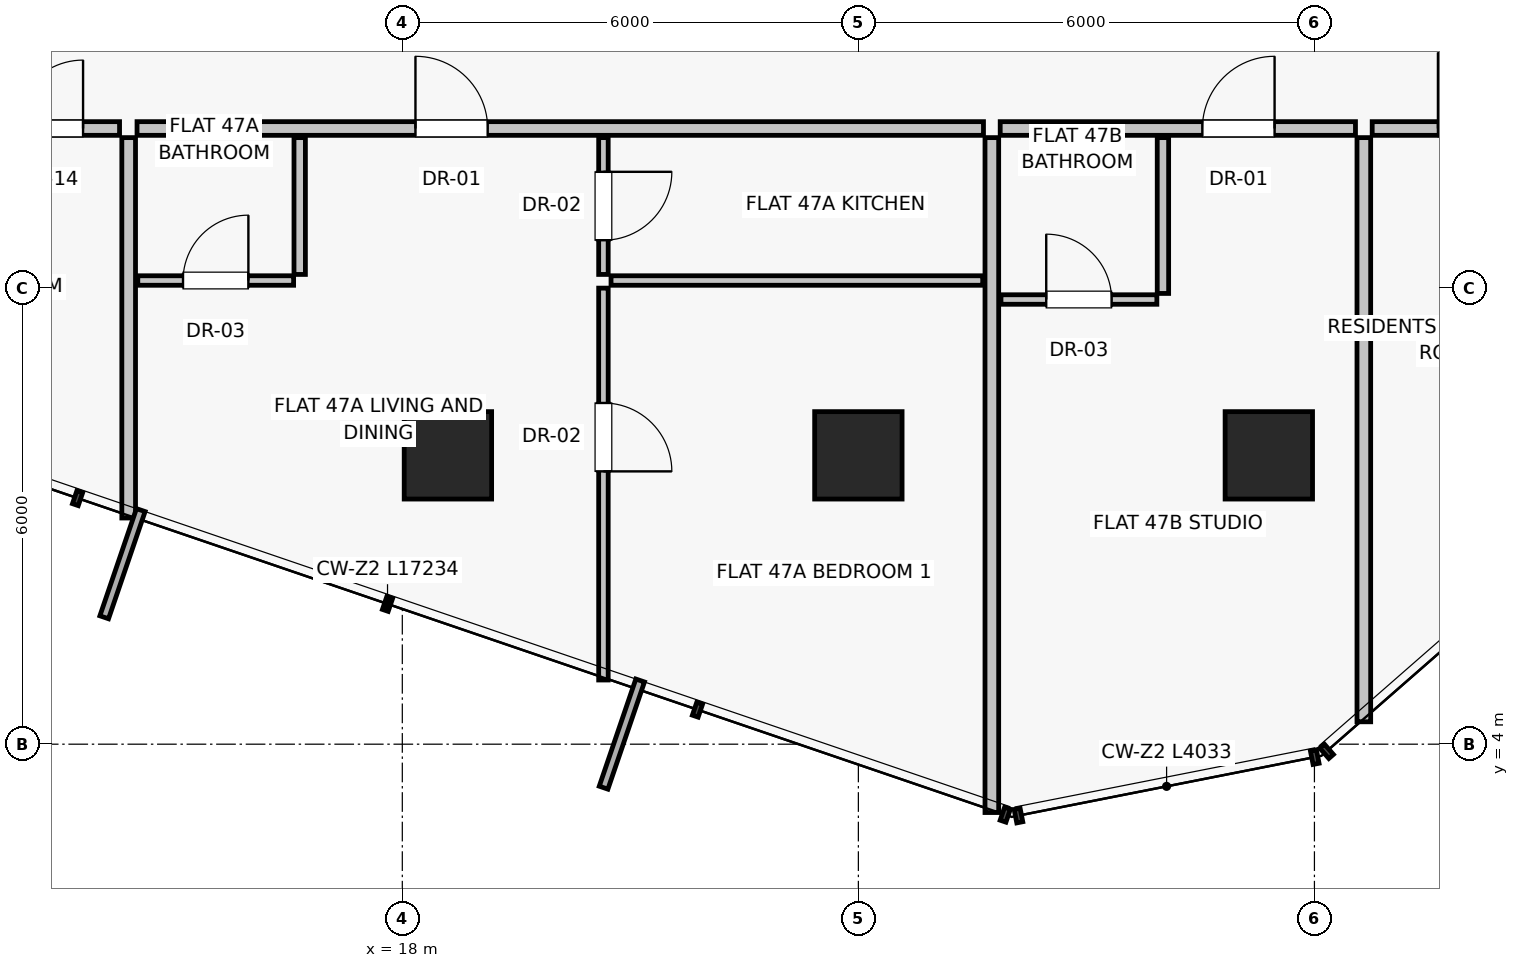
"""IFC4 building model, lengths in metres.
Left out: names, types, materials, properties, quantities, classifications, styles, units other than length and angle.
Written with IfcOpenShell. Run it as: python <this file> out.ifc"""

import sys

from ifc_helpers import new_model, si_unit, direction, frame, frame_2d, origin, origin_2d, place, context, subcontext, project, spatial, rectangle, extrude, source, transform, mapped, element, fill, save


model = new_model("IFC4")
c1 = context("Model", 3, precision=1e-05, world=origin(), true_north=direction((0.0, 1.0)))
c2 = subcontext(c1, "Body", "Model", "MODEL_VIEW")
j1 = project(units=[si_unit("LENGTHUNIT", "METRE"), si_unit("PLANEANGLEUNIT", "RADIAN")], contexts=[c1])
p1 = place(None, origin())
s1 = spatial("IfcSite", under=j1, at=p1, CompositionType="ELEMENT")
p2 = place(p1, origin())
s2 = spatial("IfcBuilding", under=s1, at=p2, CompositionType="ELEMENT")
p3 = place(p2, frame((0.0, 0.0, 166.3)))
s3 = spatial("IfcBuildingStorey", under=s2, at=p3, CompositionType="ELEMENT", Elevation=166.3)
for number, where, z_axis, x_axis in (
    (1, (18.6, 7.8, 0.0), (0.0, 0.0, 1.0), (1.0, 0.0, 0.0)),
    (2, (24.0, 7.8, 0.0), (0.0, 0.0, 1.0), (1.0, 0.0, 0.0)),
    (3, (29.4, 7.8, 0.0), (0.0, 0.0, 1.0), (1.0, 0.0, 0.0)),
):
    element("IfcColumn", number, at=place(p3, frame(where, z_axis=z_axis, x_axis=x_axis)), inside=s3, PredefinedType="COLUMN", context=c2, shape_type="SweptSolid", body=[
        extrude(rectangle(XDim=1.15, YDim=1.15, at=origin_2d()), origin(), (0.0, 0.0, 1.0), 3.25),
    ])
p4 = place(p3, frame((14.4, 11.98, 0.0), z_axis=(0.0, 0.0, 1.0), x_axis=(0.0, -1.0, 0.0)))
e4 = element("IfcWall", 4, at=p4, inside=s3, PredefinedType="PARTITIONING", context=c2, shape_type="SweptSolid", body=[
    extrude(rectangle(XDim=5.004, YDim=0.18, at=frame_2d((2.502, 0.0))), origin(), (0.0, 0.0, 1.0), 2.93),
])
p5 = place(p3, frame((14.51, 12.1, 0.0), z_axis=(0.0, 0.0, 1.0), x_axis=(1.0, 0.0, 0.0)))
e5 = element("IfcWall", 5, at=p5, inside=s3, PredefinedType="PARTITIONING", context=c2, shape_type="SweptSolid", body=[
    extrude(rectangle(XDim=11.136, YDim=0.18, at=frame_2d((5.568, 0.0))), origin(), (0.0, 0.0, 1.0), 2.51),
])
p6 = place(p5, frame((3.663, 0.0, 0.0)))
e6 = element("IfcOpeningElement", 6, at=p6, cuts=e5, PredefinedType="OPENING", context=c2, shape_type="SweptSolid", body=[
    extrude(rectangle(XDim=0.95, YDim=2.02, at=frame_2d((0.475, 1.01))), frame((0.0, 0.1, 0.0), z_axis=(0.0, -1.0, 0.0), x_axis=(1.0, 0.0, 0.0)), (0.0, 0.0, 1.0), 0.2),
])
p7 = place(p3, frame((16.65, 11.98, 0.0), z_axis=(0.0, 0.0, 1.0), x_axis=(0.0, -1.0, 0.0)))
e7 = element("IfcWall", 7, at=p7, inside=s3, PredefinedType="PARTITIONING", context=c2, shape_type="SweptSolid", body=[
    extrude(rectangle(XDim=1.8, YDim=0.15, at=frame_2d((0.9, 0.0))), origin(), (0.0, 0.0, 1.0), 2.93),
])
p8 = place(p3, frame((14.52, 10.1, 0.0), z_axis=(0.0, 0.0, 1.0), x_axis=(1.0, 0.0, 0.0)))
e8 = element("IfcWall", 8, at=p8, inside=s3, PredefinedType="PARTITIONING", context=c2, shape_type="SweptSolid", body=[
    extrude(rectangle(XDim=2.05, YDim=0.125, at=frame_2d((1.025, 0.0))), origin(), (0.0, 0.0, 1.0), 2.93),
])
p9 = place(p8, frame((0.595, 0.0, 0.0)))
e9 = element("IfcOpeningElement", 9, at=p9, cuts=e8, PredefinedType="OPENING", context=c2, shape_type="SweptSolid", body=[
    extrude(rectangle(XDim=0.86, YDim=2.01, at=frame_2d((0.43, 1.005))), frame((0.0, 0.073, 0.0), z_axis=(0.0, -1.0, 0.0), x_axis=(1.0, 0.0, 0.0)), (0.0, 0.0, 1.0), 0.145),
])
p10 = place(p3, frame((20.646, 11.98, 0.0), z_axis=(0.0, 0.0, 1.0), x_axis=(0.0, -1.0, 0.0)))
e10 = element("IfcWall", 10, at=p10, inside=s3, PredefinedType="PARTITIONING", context=c2, shape_type="SweptSolid", body=[
    extrude(rectangle(XDim=1.8, YDim=0.125, at=frame_2d((0.9, 0.0))), origin(), (0.0, 0.0, 1.0), 2.93),
])
p11 = place(p10, frame((0.45, 0.0, 0.0)))
e11 = element("IfcOpeningElement", 11, at=p11, cuts=e10, PredefinedType="OPENING", context=c2, shape_type="SweptSolid", body=[
    extrude(rectangle(XDim=0.9, YDim=2.01, at=frame_2d((0.45, 1.005))), frame((0.0, 0.073, 0.0), z_axis=(0.0, -1.0, 0.0), x_axis=(1.0, 0.0, 0.0)), (0.0, 0.0, 1.0), 0.145),
])
p12 = place(p3, frame((20.746, 10.1, 0.0), z_axis=(0.0, 0.0, 1.0), x_axis=(1.0, 0.0, 0.0)))
e12 = element("IfcWall", 12, at=p12, inside=s3, PredefinedType="PARTITIONING", context=c2, shape_type="SweptSolid", body=[
    extrude(rectangle(XDim=4.89, YDim=0.125, at=frame_2d((2.445, 0.0))), origin(), (0.0, 0.0, 1.0), 2.93),
])
p13 = place(p3, frame((20.646, 10.0, 0.0), z_axis=(0.0, 0.0, 1.0), x_axis=(0.0, -1.0, 0.0)))
e13 = element("IfcWall", 13, at=p13, inside=s3, PredefinedType="PARTITIONING", context=c2, shape_type="SweptSolid", body=[
    extrude(rectangle(XDim=5.156, YDim=0.125, at=frame_2d((2.578, 0.0))), origin(), (0.0, 0.0, 1.0), 2.93),
])
p14 = place(p13, frame((1.511, 0.0, 0.0)))
e14 = element("IfcOpeningElement", 14, at=p14, cuts=e13, PredefinedType="OPENING", context=c2, shape_type="SweptSolid", body=[
    extrude(rectangle(XDim=0.9, YDim=2.01, at=frame_2d((0.45, 1.005))), frame((0.0, 0.073, 0.0), z_axis=(0.0, -1.0, 0.0), x_axis=(1.0, 0.0, 0.0)), (0.0, 0.0, 1.0), 0.145),
])
p15 = place(p3, frame((25.756, 11.98, 0.0), z_axis=(0.0, 0.0, 1.0), x_axis=(0.0, -1.0, 0.0)))
e15 = element("IfcWall", 15, at=p15, inside=s3, PredefinedType="PARTITIONING", context=c2, shape_type="SweptSolid", body=[
    extrude(rectangle(XDim=8.879, YDim=0.18, at=frame_2d((4.439, 0.0))), origin(), (0.0, 0.0, 1.0), 2.93),
])
p16 = place(p3, frame((30.76, 12.1, 0.0), z_axis=(0.0, 0.0, 1.0), x_axis=(1.0, 0.0, 0.0)))
e16 = element("IfcWall", 16, at=p16, inside=s3, PredefinedType="PARTITIONING", context=c2, shape_type="SweptSolid", body=[
    extrude(rectangle(XDim=2.73, YDim=0.18, at=frame_2d((1.365, 0.0))), origin(), (0.0, 0.0, 1.0), 2.93),
])
p17 = place(p16, frame((0.865, 0.0, 0.0)))
e17 = element("IfcOpeningElement", 17, at=p17, cuts=e16, PredefinedType="OPENING", context=c2, shape_type="SweptSolid", body=[
    extrude(rectangle(XDim=1.0, YDim=2.01, at=frame_2d((0.5, 1.005))), frame((0.0, 0.1, 0.0), z_axis=(0.0, -1.0, 0.0), x_axis=(1.0, 0.0, 0.0)), (0.0, 0.0, 1.0), 0.2),
])
p18 = place(p3, frame((30.65, 11.98, 0.0), z_axis=(0.0, 0.0, 1.0), x_axis=(0.0, -1.0, 0.0)))
e18 = element("IfcWall", 18, at=p18, inside=s3, PredefinedType="PARTITIONING", context=c2, shape_type="SweptSolid", body=[
    extrude(rectangle(XDim=7.685, YDim=0.18, at=frame_2d((3.843, 0.0))), origin(), (0.0, 0.0, 1.0), 2.93),
])
p19 = place(p3, frame((25.866, 12.1, 0.0), z_axis=(0.0, 0.0, 1.0), x_axis=(1.0, 0.0, 0.0)))
e19 = element("IfcWall", 19, at=p19, inside=s3, PredefinedType="PARTITIONING", context=c2, shape_type="SweptSolid", body=[
    extrude(rectangle(XDim=4.674, YDim=0.18, at=frame_2d((2.337, 0.0))), origin(), (0.0, 0.0, 1.0), 2.51),
])
p20 = place(p19, frame((2.66, 0.0, 0.0)))
e20 = element("IfcOpeningElement", 20, at=p20, cuts=e19, PredefinedType="OPENING", context=c2, shape_type="SweptSolid", body=[
    extrude(rectangle(XDim=0.95, YDim=2.02, at=frame_2d((0.475, 1.01))), frame((0.0, 0.1, 0.0), z_axis=(0.0, -1.0, 0.0), x_axis=(1.0, 0.0, 0.0)), (0.0, 0.0, 1.0), 0.2),
])
p21 = place(p3, frame((28.007, 11.98, 0.0), z_axis=(0.0, 0.0, 1.0), x_axis=(0.0, -1.0, 0.0)))
e21 = element("IfcWall", 21, at=p21, inside=s3, PredefinedType="PARTITIONING", context=c2, shape_type="SweptSolid", body=[
    extrude(rectangle(XDim=2.05, YDim=0.15, at=frame_2d((1.025, 0.0))), origin(), (0.0, 0.0, 1.0), 2.93),
])
p22 = place(p3, frame((25.876, 9.85, 0.0), z_axis=(0.0, 0.0, 1.0), x_axis=(1.0, 0.0, 0.0)))
e22 = element("IfcWall", 22, at=p22, inside=s3, PredefinedType="PARTITIONING", context=c2, shape_type="SweptSolid", body=[
    extrude(rectangle(XDim=2.051, YDim=0.125, at=frame_2d((1.025, 0.0))), origin(), (0.0, 0.0, 1.0), 2.93),
])
p23 = place(p22, frame((0.595, 0.0, 0.0)))
e23 = element("IfcOpeningElement", 23, at=p23, cuts=e22, PredefinedType="OPENING", context=c2, shape_type="SweptSolid", body=[
    extrude(rectangle(XDim=0.86, YDim=2.01, at=frame_2d((0.43, 1.005))), frame((0.0, 0.073, 0.0), z_axis=(0.0, -1.0, 0.0), x_axis=(1.0, 0.0, 0.0)), (0.0, 0.0, 1.0), 0.145),
])
p24 = place(p3, frame((12.42, 12.1, 0.0), z_axis=(0.0, 0.0, 1.0), x_axis=(1.0, 0.0, 0.0)))
e24 = element("IfcWall", 24, at=p24, inside=s3, PredefinedType="PARTITIONING", context=c2, shape_type="SweptSolid", body=[
    extrude(rectangle(XDim=1.86, YDim=0.18, at=frame_2d((0.93, 0.0))), origin(), (0.0, 0.0, 1.0), 2.93),
])
p25 = place(p24, frame((0.48, 0.0, 0.0)))
e25 = element("IfcOpeningElement", 25, at=p25, cuts=e24, PredefinedType="OPENING", context=c2, shape_type="SweptSolid", body=[
    extrude(rectangle(XDim=0.9, YDim=2.01, at=frame_2d((0.45, 1.005))), frame((0.0, 0.1, 0.0), z_axis=(0.0, -1.0, 0.0), x_axis=(1.0, 0.0, 0.0)), (0.0, 0.0, 1.0), 0.2),
])
m1 = source(origin(), c2, "Body", "SweptSolid", [
    extrude(rectangle(XDim=0.95, YDim=2.02, at=frame_2d((0.475, 1.01))), frame((0.0, 0.025, 0.0), z_axis=(0.0, -1.0, 0.0), x_axis=(1.0, 0.0, 0.0)), (0.0, 0.0, 1.0), 0.05),
])
p26 = place(p6, origin())
e26 = element("IfcDoor", 26, at=p26, inside=s3, OperationType="SINGLE_SWING_LEFT", PredefinedType="DOOR", context=c2, shape_type="MappedRepresentation", body=[
    mapped(m1, transform((0.0, 0.0, 0.0), scale=1.0)),
])
fill(e6, e26)
m2 = source(origin(), c2, "Body", "SweptSolid", [
    extrude(rectangle(XDim=0.86, YDim=2.01, at=frame_2d((0.43, 1.005))), frame((0.0, 0.025, 0.0), z_axis=(0.0, -1.0, 0.0), x_axis=(1.0, 0.0, 0.0)), (0.0, 0.0, 1.0), 0.05),
])
p27 = place(p9, origin())
e27 = element("IfcDoor", 27, at=p27, inside=s3, OperationType="SINGLE_SWING_RIGHT", PredefinedType="DOOR", context=c2, shape_type="MappedRepresentation", body=[
    mapped(m2, transform((0.0, 0.0, 0.0), scale=1.0)),
])
fill(e9, e27)
m3 = source(origin(), c2, "Body", "SweptSolid", [
    extrude(rectangle(XDim=0.9, YDim=2.01, at=frame_2d((0.45, 1.005))), frame((0.0, 0.025, 0.0), z_axis=(0.0, -1.0, 0.0), x_axis=(1.0, 0.0, 0.0)), (0.0, 0.0, 1.0), 0.05),
])
p28 = place(p11, origin())
e28 = element("IfcDoor", 28, at=p28, inside=s3, OperationType="SINGLE_SWING_LEFT", PredefinedType="DOOR", context=c2, shape_type="MappedRepresentation", body=[
    mapped(m3, transform((0.0, 0.0, 0.0), scale=1.0)),
])
fill(e11, e28)
p29 = place(p14, origin())
e29 = element("IfcDoor", 29, at=p29, inside=s3, OperationType="SINGLE_SWING_RIGHT", PredefinedType="DOOR", context=c2, shape_type="MappedRepresentation", body=[
    mapped(m3, transform((0.0, 0.0, 0.0), scale=1.0)),
])
fill(e14, e29)
m4 = source(origin(), c2, "Body", "SweptSolid", [
    extrude(rectangle(XDim=1.0, YDim=2.01, at=frame_2d((0.5, 1.005))), frame((0.0, 0.025, 0.0), z_axis=(0.0, -1.0, 0.0), x_axis=(1.0, 0.0, 0.0)), (0.0, 0.0, 1.0), 0.05),
])
p30 = place(p17, origin())
e30 = element("IfcDoor", 30, at=p30, inside=s3, OperationType="SINGLE_SWING_LEFT", PredefinedType="DOOR", context=c2, shape_type="MappedRepresentation", body=[
    mapped(m4, transform((0.0, 0.0, 0.0), scale=1.0)),
])
fill(e17, e30)
p31 = place(p20, origin())
e31 = element("IfcDoor", 31, at=p31, inside=s3, OperationType="SINGLE_SWING_RIGHT", PredefinedType="DOOR", context=c2, shape_type="MappedRepresentation", body=[
    mapped(m1, transform((0.0, 0.0, 0.0), scale=1.0)),
])
fill(e20, e31)
p32 = place(p23, origin())
e32 = element("IfcDoor", 32, at=p32, inside=s3, OperationType="SINGLE_SWING_LEFT", PredefinedType="DOOR", context=c2, shape_type="MappedRepresentation", body=[
    mapped(m2, transform((0.0, 0.0, 0.0), scale=1.0)),
])
fill(e23, e32)
p33 = place(p25, origin())
e33 = element("IfcDoor", 33, at=p33, inside=s3, OperationType="SINGLE_SWING_RIGHT", PredefinedType="DOOR", context=c2, shape_type="MappedRepresentation", body=[
    mapped(m3, transform((0.0, 0.0, 0.0), scale=1.0)),
])
fill(e25, e33)
save(model, sys.argv[1])
